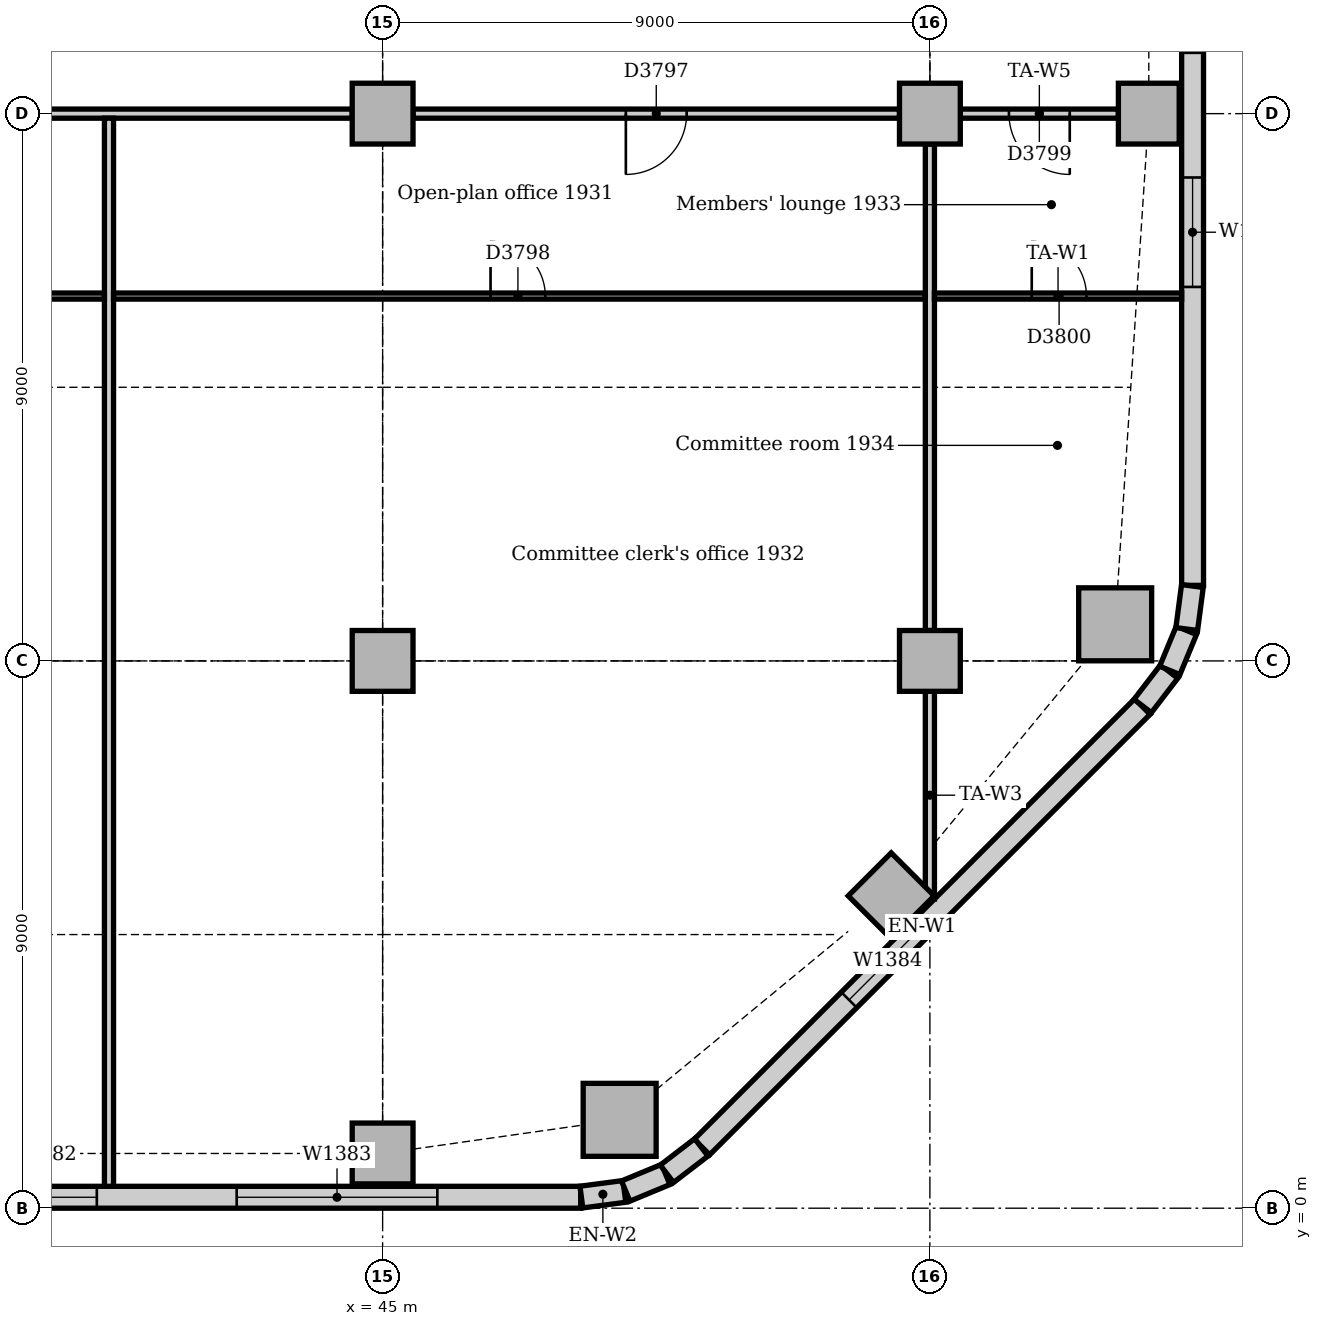
"""IFC4 building model, lengths in metres.
Left out: names, types, materials, properties, quantities, classifications, styles, units other than length and angle.
Written with IfcOpenShell. Run it as: python <this file> out.ifc"""

import sys

from ifc_helpers import new_model, si_unit, direction, frame, frame_2d, origin, origin_2d, place, context, subcontext, project, spatial, rectangle, extrude, element, fill, save


model = new_model("IFC4")
c1 = context("Model", 3, precision=1e-05, world=origin(), true_north=direction((0.0, 1.0)))
c2 = subcontext(c1, "Body", "Model", "MODEL_VIEW")
j1 = project(units=[si_unit("LENGTHUNIT", "METRE"), si_unit("PLANEANGLEUNIT", "RADIAN")], contexts=[c1])
p1 = place(None, origin())
s1 = spatial("IfcSite", under=j1, at=p1, CompositionType="ELEMENT")
p2 = place(p1, origin())
s2 = spatial("IfcBuilding", under=s1, at=p2, CompositionType="ELEMENT")
p3 = place(p2, frame((0.0, 0.0, 83.0)))
s3 = spatial("IfcBuildingStorey", under=s2, at=p3, CompositionType="ELEMENT", Elevation=83.0)
for number, where, z_axis, x_axis in (
    (1, (48.898, 1.453, 0.0), (0.0, 0.0, 1.0), (1.0, 0.0, 0.0)),
    (2, (57.047, 9.602, 0.0), (0.0, 0.0, 1.0), (1.0, 0.0, 0.0)),
):
    element("IfcColumn", number, at=place(p3, frame(where, z_axis=z_axis, x_axis=x_axis)), inside=s3, PredefinedType="COLUMN", context=c2, shape_type="SweptSolid", body=[
        extrude(rectangle(XDim=1.2, YDim=1.2, at=origin_2d()), origin(), (0.0, 0.0, 1.0), 3.85),
    ])
for number, where, z_axis, x_axis in (
    (3, (45.0, 0.9, 0.0), (0.0, 0.0, 1.0), (1.0, 0.0, 0.0)),
    (4, (53.364, 5.136, 0.0), (0.0, 0.0, 1.0), (0.707, 0.707, 0.0)),
    (5, (57.6, 18.0, 0.0), (0.0, 0.0, 1.0), (1.0, 0.0, 0.0)),
    (6, (45.0, 9.0, 0.0), (0.0, 0.0, 1.0), (1.0, 0.0, 0.0)),
    (7, (45.0, 18.0, 0.0), (0.0, 0.0, 1.0), (1.0, 0.0, 0.0)),
    (8, (54.0, 9.0, 0.0), (0.0, 0.0, 1.0), (1.0, 0.0, 0.0)),
    (9, (54.0, 18.0, 0.0), (0.0, 0.0, 1.0), (1.0, 0.0, 0.0)),
):
    element("IfcColumn", number, at=place(p3, frame(where, z_axis=z_axis, x_axis=x_axis)), inside=s3, PredefinedType="COLUMN", context=c2, shape_type="SweptSolid", body=[
        extrude(rectangle(XDim=1.0, YDim=1.0, at=origin_2d()), origin(), (0.0, 0.0, 1.0), 3.85),
    ])
p4 = place(p3, frame((4.243, 0.18, 0.0), z_axis=(0.0, 0.0, 1.0), x_axis=(1.0, 0.0, 0.0)))
e10 = element("IfcWall", 10, at=p4, inside=s3, PredefinedType="STANDARD", context=c2, shape_type="SweptSolid", body=[
    extrude(rectangle(XDim=44.015, YDim=0.36, at=frame_2d((22.007, 0.0))), origin(), (0.0, 0.0, 1.0), 3.85),
])
p5 = place(p4, frame((2.357, 0.0, 0.9)))
e11 = element("IfcOpeningElement", 11, at=p5, cuts=e10, PredefinedType="OPENING", context=c2, shape_type="SweptSolid", body=[
    extrude(rectangle(XDim=3.3, YDim=1.6, at=frame_2d((1.65, 0.8))), frame((0.0, 0.19, 0.0), z_axis=(0.0, -1.0, 0.0), x_axis=(1.0, 0.0, 0.0)), (0.0, 0.0, 1.0), 0.38),
])
p6 = place(p4, frame((7.307, 0.0, 0.9)))
e12 = element("IfcOpeningElement", 12, at=p6, cuts=e10, PredefinedType="OPENING", context=c2, shape_type="SweptSolid", body=[
    extrude(rectangle(XDim=1.8, YDim=1.6, at=frame_2d((0.9, 0.8))), frame((0.0, 0.19, 0.0), z_axis=(0.0, -1.0, 0.0), x_axis=(1.0, 0.0, 0.0)), (0.0, 0.0, 1.0), 0.38),
])
p7 = place(p4, frame((11.357, 0.0, 0.9)))
e13 = element("IfcOpeningElement", 13, at=p7, cuts=e10, PredefinedType="OPENING", context=c2, shape_type="SweptSolid", body=[
    extrude(rectangle(XDim=3.3, YDim=1.6, at=frame_2d((1.65, 0.8))), frame((0.0, 0.19, 0.0), z_axis=(0.0, -1.0, 0.0), x_axis=(1.0, 0.0, 0.0)), (0.0, 0.0, 1.0), 0.38),
])
p8 = place(p4, frame((16.307, 0.0, 0.9)))
e14 = element("IfcOpeningElement", 14, at=p8, cuts=e10, PredefinedType="OPENING", context=c2, shape_type="SweptSolid", body=[
    extrude(rectangle(XDim=1.8, YDim=1.6, at=frame_2d((0.9, 0.8))), frame((0.0, 0.19, 0.0), z_axis=(0.0, -1.0, 0.0), x_axis=(1.0, 0.0, 0.0)), (0.0, 0.0, 1.0), 0.38),
])
p9 = place(p4, frame((20.357, 0.0, 0.9)))
e15 = element("IfcOpeningElement", 15, at=p9, cuts=e10, PredefinedType="OPENING", context=c2, shape_type="SweptSolid", body=[
    extrude(rectangle(XDim=3.3, YDim=1.6, at=frame_2d((1.65, 0.8))), frame((0.0, 0.19, 0.0), z_axis=(0.0, -1.0, 0.0), x_axis=(1.0, 0.0, 0.0)), (0.0, 0.0, 1.0), 0.38),
])
p10 = place(p4, frame((24.857, 0.0, 0.9)))
e16 = element("IfcOpeningElement", 16, at=p10, cuts=e10, PredefinedType="OPENING", context=c2, shape_type="SweptSolid", body=[
    extrude(rectangle(XDim=3.3, YDim=1.6, at=frame_2d((1.65, 0.8))), frame((0.0, 0.19, 0.0), z_axis=(0.0, -1.0, 0.0), x_axis=(1.0, 0.0, 0.0)), (0.0, 0.0, 1.0), 0.38),
])
p11 = place(p4, frame((29.707, 0.0, 0.9)))
e17 = element("IfcOpeningElement", 17, at=p11, cuts=e10, PredefinedType="OPENING", context=c2, shape_type="SweptSolid", body=[
    extrude(rectangle(XDim=3.3, YDim=1.6, at=frame_2d((1.65, 0.8))), frame((0.0, 0.19, 0.0), z_axis=(0.0, -1.0, 0.0), x_axis=(1.0, 0.0, 0.0)), (0.0, 0.0, 1.0), 0.38),
])
p12 = place(p4, frame((34.257, 0.0, 0.9)))
e18 = element("IfcOpeningElement", 18, at=p12, cuts=e10, PredefinedType="OPENING", context=c2, shape_type="SweptSolid", body=[
    extrude(rectangle(XDim=1.8, YDim=1.6, at=frame_2d((0.9, 0.8))), frame((0.0, 0.19, 0.0), z_axis=(0.0, -1.0, 0.0), x_axis=(1.0, 0.0, 0.0)), (0.0, 0.0, 1.0), 0.38),
])
p13 = place(p4, frame((38.357, 0.0, 0.9)))
e19 = element("IfcOpeningElement", 19, at=p13, cuts=e10, PredefinedType="OPENING", context=c2, shape_type="SweptSolid", body=[
    extrude(rectangle(XDim=3.3, YDim=1.6, at=frame_2d((1.65, 0.8))), frame((0.0, 0.19, 0.0), z_axis=(0.0, -1.0, 0.0), x_axis=(1.0, 0.0, 0.0)), (0.0, 0.0, 1.0), 0.38),
])
p14 = place(p3, frame((50.251, 1.006, 0.0), z_axis=(0.0, 0.0, 1.0), x_axis=(0.707106781187, 0.707106781187, 0.0)))
e20 = element("IfcWall", 20, at=p14, inside=s3, PredefinedType="STANDARD", context=c2, shape_type="SweptSolid", body=[
    extrude(rectangle(XDim=10.243, YDim=0.36, at=frame_2d((5.121, 0.0))), origin(), (0.0, 0.0, 1.0), 3.85),
])
p15 = place(p14, frame((3.421, 0.0, 0.9)))
e21 = element("IfcOpeningElement", 21, at=p15, cuts=e20, PredefinedType="OPENING", context=c2, shape_type="SweptSolid", body=[
    extrude(rectangle(XDim=1.8, YDim=1.6, at=frame_2d((0.9, 0.8))), frame((0.0, 0.19, 0.0), z_axis=(0.0, -1.0, 0.0), x_axis=(1.0, 0.0, 0.0)), (0.0, 0.0, 1.0), 0.38),
])
p16 = place(p3, frame((58.32, 10.243, 0.0), z_axis=(0.0, 0.0, 1.0), x_axis=(0.0, 1.0, 0.0)))
e22 = element("IfcWall", 22, at=p16, inside=s3, PredefinedType="STANDARD", context=c2, shape_type="SweptSolid", body=[
    extrude(rectangle(XDim=24.515, YDim=0.36, at=frame_2d((12.257, 0.0))), origin(), (0.0, 0.0, 1.0), 3.85),
])
p17 = place(p16, frame((4.907, 0.0, 0.9)))
e23 = element("IfcOpeningElement", 23, at=p17, cuts=e22, PredefinedType="OPENING", context=c2, shape_type="SweptSolid", body=[
    extrude(rectangle(XDim=1.8, YDim=1.6, at=frame_2d((0.9, 0.8))), frame((0.0, 0.19, 0.0), z_axis=(0.0, -1.0, 0.0), x_axis=(1.0, 0.0, 0.0)), (0.0, 0.0, 1.0), 0.38),
])
p18 = place(p16, frame((8.757, 0.0, 0.9)))
e24 = element("IfcOpeningElement", 24, at=p18, cuts=e22, PredefinedType="OPENING", context=c2, shape_type="SweptSolid", body=[
    extrude(rectangle(XDim=1.8, YDim=1.6, at=frame_2d((0.9, 0.8))), frame((0.0, 0.19, 0.0), z_axis=(0.0, -1.0, 0.0), x_axis=(1.0, 0.0, 0.0)), (0.0, 0.0, 1.0), 0.38),
])
p19 = place(p16, frame((12.557, 0.0, 0.9)))
e25 = element("IfcOpeningElement", 25, at=p19, cuts=e22, PredefinedType="OPENING", context=c2, shape_type="SweptSolid", body=[
    extrude(rectangle(XDim=3.3, YDim=1.6, at=frame_2d((1.65, 0.8))), frame((0.0, 0.19, 0.0), z_axis=(0.0, -1.0, 0.0), x_axis=(1.0, 0.0, 0.0)), (0.0, 0.0, 1.0), 0.38),
])
p20 = place(p16, frame((17.357, 0.0, 0.9)))
e26 = element("IfcOpeningElement", 26, at=p20, cuts=e22, PredefinedType="OPENING", context=c2, shape_type="SweptSolid", body=[
    extrude(rectangle(XDim=3.3, YDim=1.6, at=frame_2d((1.65, 0.8))), frame((0.0, 0.19, 0.0), z_axis=(0.0, -1.0, 0.0), x_axis=(1.0, 0.0, 0.0)), (0.0, 0.0, 1.0), 0.38),
])
for number, where, z_axis, x_axis in (
    (27, (48.269, 0.183, 0.0), (0.0, 0.0, 1.0), (0.991, 0.131, 0.0)),
    (28, (48.997, 0.282, 0.0), (0.0, 0.0, 1.0), (0.924, 0.383, 0.0)),
):
    element("IfcWall", number, at=place(p3, frame(where, z_axis=z_axis, x_axis=x_axis)), inside=s3, PredefinedType="STANDARD", context=c2, shape_type="SweptSolid", body=[
        extrude(rectangle(XDim=0.713, YDim=0.36, at=frame_2d((0.356, 0.0))), origin(), (0.0, 0.0, 1.0), 3.85),
    ])
for number, where, z_axis, x_axis in (
    (29, (49.675, 0.566, 0.0), (0.0, 0.0, 1.0), (0.793, 0.609, 0.0)),
    (30, (57.5, 8.259, 0.0), (0.0, 0.0, 1.0), (0.609, 0.793, 0.0)),
):
    element("IfcWall", number, at=place(p3, frame(where, z_axis=z_axis, x_axis=x_axis)), inside=s3, PredefinedType="STANDARD", context=c2, shape_type="SweptSolid", body=[
        extrude(rectangle(XDim=0.713, YDim=0.36, at=frame_2d((0.357, 0.0))), origin(), (0.0, 0.0, 1.0), 3.85),
    ])
for number, where, z_axis, x_axis in (
    (31, (57.945, 8.844, 0.0), (0.0, 0.0, 1.0), (0.383, 0.924, 0.0)),
    (32, (58.224, 9.524, 0.0), (0.0, 0.0, 1.0), (0.131, 0.991, 0.0)),
):
    element("IfcWall", number, at=place(p3, frame(where, z_axis=z_axis, x_axis=x_axis)), inside=s3, PredefinedType="STANDARD", context=c2, shape_type="SweptSolid", body=[
        extrude(rectangle(XDim=0.713, YDim=0.36, at=frame_2d((0.356, 0.0))), origin(), (0.0, 0.0, 1.0), 3.85),
    ])
p21 = place(p3, frame((54.5, 18.0, 0.0), z_axis=(0.0, 0.0, 1.0), x_axis=(1.0, 0.0, 0.0)))
e33 = element("IfcWall", 33, at=p21, inside=s3, PredefinedType="PARTITIONING", context=c2, shape_type="SweptSolid", body=[
    extrude(rectangle(XDim=2.6, YDim=0.15, at=frame_2d((1.3, 0.0))), origin(), (0.0, 0.0, 1.0), 3.602),
])
p22 = place(p21, frame((0.8, 0.0, 0.0)))
e34 = element("IfcOpeningElement", 34, at=p22, cuts=e33, PredefinedType="OPENING", context=c2, shape_type="SweptSolid", body=[
    extrude(rectangle(XDim=1.0, YDim=2.1, at=frame_2d((0.5, 1.05))), frame((0.0, 0.085, 0.0), z_axis=(0.0, -1.0, 0.0), x_axis=(1.0, 0.0, 0.0)), (0.0, 0.0, 1.0), 0.17),
])
p23 = place(p3, frame((45.5, 18.0, 0.0), z_axis=(0.0, 0.0, 1.0), x_axis=(1.0, 0.0, 0.0)))
e35 = element("IfcWall", 35, at=p23, inside=s3, PredefinedType="PARTITIONING", context=c2, shape_type="SweptSolid", body=[
    extrude(rectangle(XDim=8.0, YDim=0.15, at=frame_2d((4.0, 0.0))), origin(), (0.0, 0.0, 1.0), 3.15),
])
p24 = place(p23, frame((3.5, 0.0, 0.0)))
e36 = element("IfcOpeningElement", 36, at=p24, cuts=e35, PredefinedType="OPENING", context=c2, shape_type="SweptSolid", body=[
    extrude(rectangle(XDim=1.0, YDim=2.1, at=frame_2d((0.5, 1.05))), frame((0.0, 0.085, 0.0), z_axis=(0.0, -1.0, 0.0), x_axis=(1.0, 0.0, 0.0)), (0.0, 0.0, 1.0), 0.17),
])
p25 = place(p3, frame((36.5, 18.0, 0.0), z_axis=(0.0, 0.0, 1.0), x_axis=(1.0, 0.0, 0.0)))
e37 = element("IfcWall", 37, at=p25, inside=s3, PredefinedType="PARTITIONING", context=c2, shape_type="SweptSolid", body=[
    extrude(rectangle(XDim=8.0, YDim=0.15, at=frame_2d((4.0, 0.0))), origin(), (0.0, 0.0, 1.0), 3.15),
])
p26 = place(p3, frame((40.5, 0.36, 0.0), z_axis=(0.0, 0.0, 1.0), x_axis=(0.0, 1.0, 0.0)))
e38 = element("IfcWall", 38, at=p26, inside=s3, PredefinedType="PARTITIONING", context=c2, shape_type="SweptSolid", body=[
    extrude(rectangle(XDim=17.565, YDim=0.15, at=frame_2d((8.783, 0.0))), origin(), (0.0, 0.0, 1.0), 3.85),
])
p27 = place(p3, frame((54.0, 5.084, 0.0), z_axis=(0.0, 0.0, 1.0), x_axis=(0.0, 1.0, 0.0)))
e39 = element("IfcWall", 39, at=p27, inside=s3, PredefinedType="PARTITIONING", context=c2, shape_type="SweptSolid", body=[
    extrude(rectangle(XDim=3.416, YDim=0.15, at=frame_2d((1.708, 0.0))), origin(), (0.0, 0.0, 1.0), 3.652),
])
p28 = place(p3, frame((54.0, 9.5, 0.0), z_axis=(0.0, 0.0, 1.0), x_axis=(0.0, 1.0, 0.0)))
e40 = element("IfcWall", 40, at=p28, inside=s3, PredefinedType="PARTITIONING", context=c2, shape_type="SweptSolid", body=[
    extrude(rectangle(XDim=8.0, YDim=0.15, at=frame_2d((4.0, 0.0))), origin(), (0.0, 0.0, 1.0), 3.158),
])
p29 = place(p3, frame((27.075, 15.0, 0.0), z_axis=(0.0, 0.0, 1.0), x_axis=(1.0, 0.0, 0.0)))
e41 = element("IfcWall", 41, at=p29, inside=s3, PredefinedType="PARTITIONING", context=c2, shape_type="SweptSolid", body=[
    extrude(rectangle(XDim=13.35, YDim=0.1, at=frame_2d((6.675, 0.0))), origin(), (0.0, 0.0, 1.0), 3.85),
])
p30 = place(p29, frame((2.95, 0.0, 0.0)))
e42 = element("IfcOpeningElement", 42, at=p30, cuts=e41, PredefinedType="OPENING", context=c2, shape_type="SweptSolid", body=[
    extrude(rectangle(XDim=0.9, YDim=2.1, at=frame_2d((0.45, 1.05))), frame((0.0, 0.06, 0.0), z_axis=(0.0, -1.0, 0.0), x_axis=(1.0, 0.0, 0.0)), (0.0, 0.0, 1.0), 0.12),
])
p31 = place(p29, frame((9.475, 0.0, 0.0)))
e43 = element("IfcOpeningElement", 43, at=p31, cuts=e41, PredefinedType="OPENING", context=c2, shape_type="SweptSolid", body=[
    extrude(rectangle(XDim=0.9, YDim=2.1, at=frame_2d((0.45, 1.05))), frame((0.0, 0.06, 0.0), z_axis=(0.0, -1.0, 0.0), x_axis=(1.0, 0.0, 0.0)), (0.0, 0.0, 1.0), 0.12),
])
p32 = place(p3, frame((40.575, 15.0, 0.0), z_axis=(0.0, 0.0, 1.0), x_axis=(1.0, 0.0, 0.0)))
e44 = element("IfcWall", 44, at=p32, inside=s3, PredefinedType="PARTITIONING", context=c2, shape_type="SweptSolid", body=[
    extrude(rectangle(XDim=13.35, YDim=0.1, at=frame_2d((6.675, 0.0))), origin(), (0.0, 0.0, 1.0), 3.85),
])
p33 = place(p32, frame((6.2, 0.0, 0.0)))
e45 = element("IfcOpeningElement", 45, at=p33, cuts=e44, PredefinedType="OPENING", context=c2, shape_type="SweptSolid", body=[
    extrude(rectangle(XDim=0.9, YDim=2.1, at=frame_2d((0.45, 1.05))), frame((0.0, 0.06, 0.0), z_axis=(0.0, -1.0, 0.0), x_axis=(1.0, 0.0, 0.0)), (0.0, 0.0, 1.0), 0.12),
])
p34 = place(p3, frame((54.075, 15.0, 0.0), z_axis=(0.0, 0.0, 1.0), x_axis=(1.0, 0.0, 0.0)))
e46 = element("IfcWall", 46, at=p34, inside=s3, PredefinedType="PARTITIONING", context=c2, shape_type="SweptSolid", body=[
    extrude(rectangle(XDim=4.065, YDim=0.1, at=frame_2d((2.033, 0.0))), origin(), (0.0, 0.0, 1.0), 3.85),
])
p35 = place(p34, frame((1.6, 0.0, 0.0)))
e47 = element("IfcOpeningElement", 47, at=p35, cuts=e46, PredefinedType="OPENING", context=c2, shape_type="SweptSolid", body=[
    extrude(rectangle(XDim=0.9, YDim=2.1, at=frame_2d((0.45, 1.05))), frame((0.0, 0.06, 0.0), z_axis=(0.0, -1.0, 0.0), x_axis=(1.0, 0.0, 0.0)), (0.0, 0.0, 1.0), 0.12),
])
p36 = place(p12, origin())
e48 = element("IfcWindow", 48, at=p36, inside=s3, PartitioningType="SINGLE_PANEL", PredefinedType="WINDOW", context=c2, shape_type="SweptSolid", body=[
    extrude(rectangle(XDim=1.8, YDim=1.6, at=frame_2d((0.9, 0.8))), frame((0.0, 0.13, 0.0), z_axis=(0.0, -1.0, 0.0), x_axis=(1.0, 0.0, 0.0)), (0.0, 0.0, 1.0), 0.06),
])
fill(e18, e48)
p37 = place(p13, origin())
e49 = element("IfcWindow", 49, at=p37, inside=s3, PartitioningType="SINGLE_PANEL", PredefinedType="WINDOW", context=c2, shape_type="SweptSolid", body=[
    extrude(rectangle(XDim=3.3, YDim=1.6, at=frame_2d((1.65, 0.8))), frame((0.0, 0.13, 0.0), z_axis=(0.0, -1.0, 0.0), x_axis=(1.0, 0.0, 0.0)), (0.0, 0.0, 1.0), 0.06),
])
fill(e19, e49)
p38 = place(p15, origin())
e50 = element("IfcWindow", 50, at=p38, inside=s3, PartitioningType="SINGLE_PANEL", PredefinedType="WINDOW", context=c2, shape_type="SweptSolid", body=[
    extrude(rectangle(XDim=1.8, YDim=1.6, at=frame_2d((0.9, 0.8))), frame((0.0, 0.13, 0.0), z_axis=(0.0, -1.0, 0.0), x_axis=(1.0, 0.0, 0.0)), (0.0, 0.0, 1.0), 0.06),
])
fill(e21, e50)
p39 = place(p17, origin())
e51 = element("IfcWindow", 51, at=p39, inside=s3, PartitioningType="SINGLE_PANEL", PredefinedType="WINDOW", context=c2, shape_type="SweptSolid", body=[
    extrude(rectangle(XDim=1.8, YDim=1.6, at=frame_2d((0.9, 0.8))), frame((0.0, 0.13, 0.0), z_axis=(0.0, -1.0, 0.0), x_axis=(1.0, 0.0, 0.0)), (0.0, 0.0, 1.0), 0.06),
])
fill(e23, e51)
p40 = place(p24, frame((1.0, 0.0, 0.0), z_axis=(0.0, 0.0, 1.0), x_axis=(-1.0, 0.0, 0.0)))
e52 = element("IfcDoor", 52, at=p40, inside=s3, OperationType="SINGLE_SWING_RIGHT", PredefinedType="DOOR", context=c2, shape_type="SweptSolid", body=[
    extrude(rectangle(XDim=1.0, YDim=2.1, at=frame_2d((0.5, 1.05))), frame((0.0, 0.025, 0.0), z_axis=(0.0, -1.0, 0.0), x_axis=(1.0, 0.0, 0.0)), (0.0, 0.0, 1.0), 0.05),
])
fill(e36, e52)
p41 = place(p33, origin())
e53 = element("IfcDoor", 53, at=p41, inside=s3, OperationType="SINGLE_SWING_LEFT", PredefinedType="DOOR", context=c2, shape_type="SweptSolid", body=[
    extrude(rectangle(XDim=0.9, YDim=2.1, at=frame_2d((0.45, 1.05))), frame((0.0, 0.025, 0.0), z_axis=(0.0, -1.0, 0.0), x_axis=(1.0, 0.0, 0.0)), (0.0, 0.0, 1.0), 0.05),
])
fill(e45, e53)
p42 = place(p22, frame((1.0, 0.0, 0.0), z_axis=(0.0, 0.0, 1.0), x_axis=(-1.0, 0.0, 0.0)))
e54 = element("IfcDoor", 54, at=p42, inside=s3, OperationType="SINGLE_SWING_LEFT", PredefinedType="DOOR", context=c2, shape_type="SweptSolid", body=[
    extrude(rectangle(XDim=1.0, YDim=2.1, at=frame_2d((0.5, 1.05))), frame((0.0, 0.025, 0.0), z_axis=(0.0, -1.0, 0.0), x_axis=(1.0, 0.0, 0.0)), (0.0, 0.0, 1.0), 0.05),
])
fill(e34, e54)
p43 = place(p35, origin())
e55 = element("IfcDoor", 55, at=p43, inside=s3, OperationType="SINGLE_SWING_LEFT", PredefinedType="DOOR", context=c2, shape_type="SweptSolid", body=[
    extrude(rectangle(XDim=0.9, YDim=2.1, at=frame_2d((0.45, 1.05))), frame((0.0, 0.025, 0.0), z_axis=(0.0, -1.0, 0.0), x_axis=(1.0, 0.0, 0.0)), (0.0, 0.0, 1.0), 0.05),
])
fill(e47, e55)
save(model, sys.argv[1])
